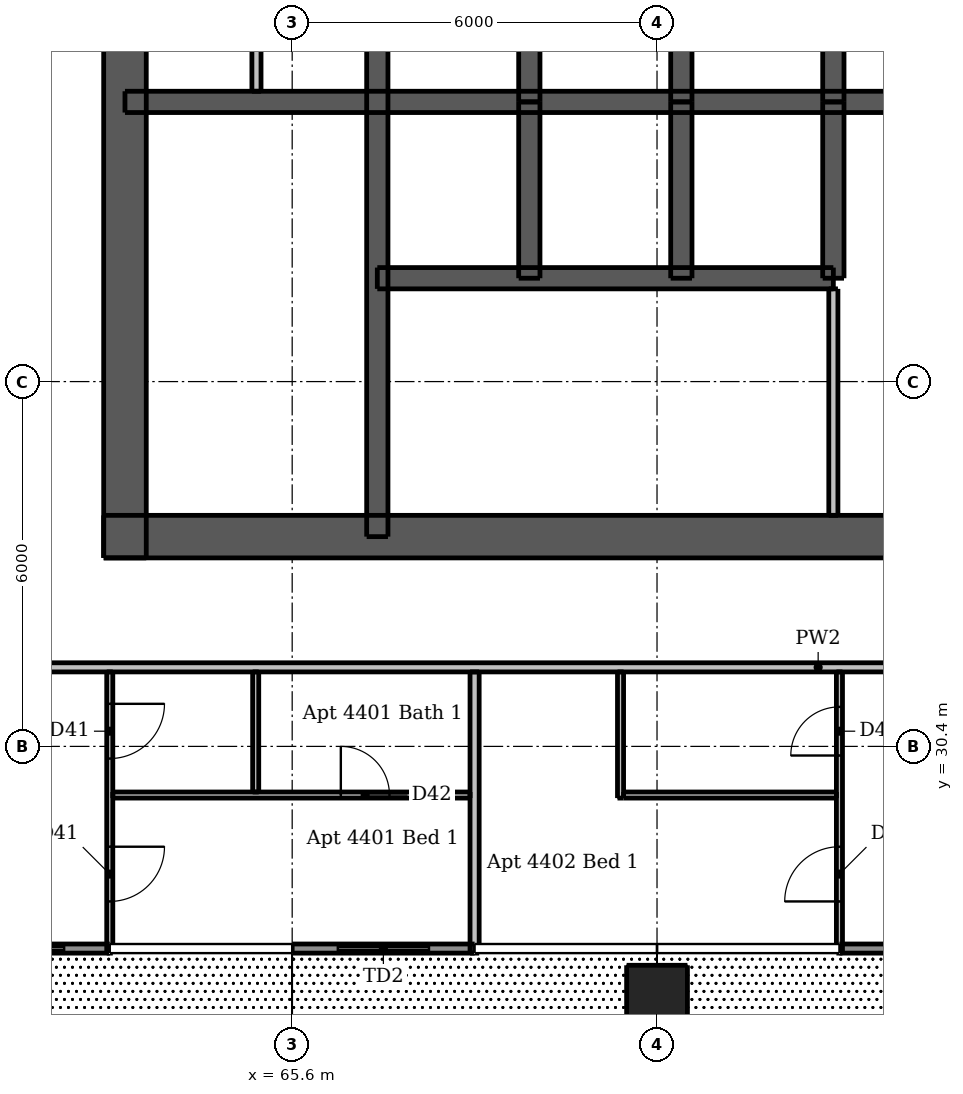
"""IFC4 building model, lengths in metres.
Left out: names, types, materials, properties, quantities, classifications, styles, units other than length and angle.
Written with IfcOpenShell. Run it as: python <this file> out.ifc"""

import sys

from ifc_helpers import new_model, si_unit, direction, frame, frame_2d, origin, origin_2d, place, context, subcontext, project, spatial, rectangle, extrude, element, fill, save


model = new_model("IFC4")
c1 = context("Model", 3, precision=1e-05, world=origin(), true_north=direction((0.0, 1.0)))
c2 = subcontext(c1, "Body", "Model", "MODEL_VIEW")
j1 = project(units=[si_unit("LENGTHUNIT", "METRE"), si_unit("PLANEANGLEUNIT", "RADIAN")], contexts=[c1])
p1 = place(None, origin())
s1 = spatial("IfcSite", under=j1, at=p1, CompositionType="ELEMENT")
p2 = place(p1, origin())
s2 = spatial("IfcBuilding", under=s1, at=p2, CompositionType="ELEMENT")
p3 = place(p2, frame((0.0, 0.0, 164.8)))
s3 = spatial("IfcBuildingStorey", under=s2, at=p3, CompositionType="ELEMENT", Elevation=164.8)
p4 = place(p3, frame((62.5, 33.85, 0.0), z_axis=(0.0, 0.0, 1.0), x_axis=(1.0, 0.0, 0.0)))
e1 = element("IfcWall", 1, at=p4, inside=s3, PredefinedType="SHEAR", context=c2, shape_type="SweptSolid", body=[
    extrude(rectangle(XDim=24.0, YDim=0.7, at=frame_2d((12.0, 0.0))), origin(), (0.0, 0.0, 1.0), 3.05),
])
p5 = place(p4, frame((1.962, 0.0, 0.0)))
e2 = element("IfcOpeningElement", 2, at=p5, cuts=e1, PredefinedType="OPENING", context=c2, shape_type="SweptSolid", body=[
    extrude(rectangle(XDim=1.1, YDim=2.1, at=frame_2d((0.55, 1.05))), frame((0.0, 0.36, 0.0), z_axis=(0.0, -1.0, 0.0), x_axis=(1.0, 0.0, 0.0)), (0.0, 0.0, 1.0), 0.72),
])
p6 = place(p4, frame((20.938, 0.0, 0.0)))
e3 = element("IfcOpeningElement", 3, at=p6, cuts=e1, PredefinedType="OPENING", context=c2, shape_type="SweptSolid", body=[
    extrude(rectangle(XDim=1.1, YDim=2.1, at=frame_2d((0.55, 1.05))), frame((0.0, 0.36, 0.0), z_axis=(0.0, -1.0, 0.0), x_axis=(1.0, 0.0, 0.0)), (0.0, 0.0, 1.0), 0.72),
])
p7 = place(p4, frame((8.0, 0.0, 0.0)))
e4 = element("IfcOpeningElement", 4, at=p7, cuts=e1, PredefinedType="OPENING", context=c2, shape_type="SweptSolid", body=[
    extrude(rectangle(XDim=1.1, YDim=2.1, at=frame_2d((0.55, 1.05))), frame((0.0, 0.36, 0.0), z_axis=(0.0, -1.0, 0.0), x_axis=(1.0, 0.0, 0.0)), (0.0, 0.0, 1.0), 0.72),
])
p8 = place(p4, frame((15.3, 0.0, 0.0)))
e5 = element("IfcOpeningElement", 5, at=p8, cuts=e1, PredefinedType="OPENING", context=c2, shape_type="SweptSolid", body=[
    extrude(rectangle(XDim=0.9, YDim=2.1, at=frame_2d((0.45, 1.05))), frame((0.0, 0.36, 0.0), z_axis=(0.0, -1.0, 0.0), x_axis=(1.0, 0.0, 0.0)), (0.0, 0.0, 1.0), 0.72),
])
p9 = place(p3, frame((62.85, 33.5, 0.0), z_axis=(0.0, 0.0, 1.0), x_axis=(0.0, 1.0, 0.0)))
e6 = element("IfcWall", 6, at=p9, inside=s3, PredefinedType="SHEAR", context=c2, shape_type="SweptSolid", body=[
    extrude(rectangle(XDim=24.0, YDim=0.7, at=frame_2d((12.0, 0.0))), origin(), (0.0, 0.0, 1.0), 3.05),
])
p10 = place(p9, frame((11.2, 0.0, 0.0)))
e7 = element("IfcOpeningElement", 7, at=p10, cuts=e6, PredefinedType="OPENING", context=c2, shape_type="SweptSolid", body=[
    extrude(rectangle(XDim=1.6, YDim=2.1, at=frame_2d((0.8, 1.05))), frame((0.0, 0.36, 0.0), z_axis=(0.0, -1.0, 0.0), x_axis=(1.0, 0.0, 0.0)), (0.0, 0.0, 1.0), 0.72),
])
p11 = place(p3, frame((62.85, 41.0, 0.0), z_axis=(0.0, 0.0, 1.0), x_axis=(1.0, 0.0, 0.0)))
e8 = element("IfcWall", 8, at=p11, inside=s3, PredefinedType="SHEAR", context=c2, shape_type="SweptSolid", body=[
    extrude(rectangle(XDim=23.3, YDim=0.35, at=frame_2d((11.65, 0.0))), origin(), (0.0, 0.0, 1.0), 3.05),
])
p12 = place(p3, frame((67.0, 33.85, 0.0), z_axis=(0.0, 0.0, 1.0), x_axis=(0.0, 1.0, 0.0)))
e9 = element("IfcWall", 9, at=p12, inside=s3, PredefinedType="SHEAR", context=c2, shape_type="SweptSolid", body=[
    extrude(rectangle(XDim=10.05, YDim=0.35, at=frame_2d((5.025, 0.0))), origin(), (0.0, 0.0, 1.0), 3.05),
])
p13 = place(p12, frame((0.55, 0.0, 0.0)))
e10 = element("IfcOpeningElement", 10, at=p13, cuts=e9, PredefinedType="OPENING", context=c2, shape_type="SweptSolid", body=[
    extrude(rectangle(XDim=1.1, YDim=2.1, at=frame_2d((0.55, 1.05))), frame((0.0, 0.185, 0.0), z_axis=(0.0, -1.0, 0.0), x_axis=(1.0, 0.0, 0.0)), (0.0, 0.0, 1.0), 0.37),
])
for number, where, z_axis, x_axis in (
    (11, (69.5, 41.0, 0.0), (0.0, 0.0, 1.0), (0.0, 1.0, 0.0)),
    (12, (72.0, 41.0, 0.0), (0.0, 0.0, 1.0), (0.0, 1.0, 0.0)),
    (13, (74.5, 41.0, 0.0), (0.0, 0.0, 1.0), (0.0, 1.0, 0.0)),
):
    element("IfcWall", number, at=place(p3, frame(where, z_axis=z_axis, x_axis=x_axis)), inside=s3, PredefinedType="SHEAR", context=c2, shape_type="SweptSolid", body=[
        extrude(rectangle(XDim=2.9, YDim=0.35, at=frame_2d((1.45, 0.0))), origin(), (0.0, 0.0, 1.0), 3.05),
    ])
p14 = place(p3, frame((67.0, 38.1, 0.0), z_axis=(0.0, 0.0, 1.0), x_axis=(1.0, 0.0, 0.0)))
e14 = element("IfcWall", 14, at=p14, inside=s3, PredefinedType="SHEAR", context=c2, shape_type="SweptSolid", body=[
    extrude(rectangle(XDim=7.5, YDim=0.35, at=frame_2d((3.75, 0.0))), origin(), (0.0, 0.0, 1.0), 3.05),
])
p15 = place(p14, frame((0.7, 0.0, 0.0)))
e15 = element("IfcOpeningElement", 15, at=p15, cuts=e14, PredefinedType="OPENING", context=c2, shape_type="SweptSolid", body=[
    extrude(rectangle(XDim=1.1, YDim=2.1, at=frame_2d((0.55, 1.05))), frame((0.0, 0.185, 0.0), z_axis=(0.0, -1.0, 0.0), x_axis=(1.0, 0.0, 0.0)), (0.0, 0.0, 1.0), 0.37),
])
p16 = place(p14, frame((3.2, 0.0, 0.0)))
e16 = element("IfcOpeningElement", 16, at=p16, cuts=e14, PredefinedType="OPENING", context=c2, shape_type="SweptSolid", body=[
    extrude(rectangle(XDim=1.1, YDim=2.1, at=frame_2d((0.55, 1.05))), frame((0.0, 0.185, 0.0), z_axis=(0.0, -1.0, 0.0), x_axis=(1.0, 0.0, 0.0)), (0.0, 0.0, 1.0), 0.37),
])
p17 = place(p14, frame((5.65, 0.0, 0.0)))
e17 = element("IfcOpeningElement", 17, at=p17, cuts=e14, PredefinedType="OPENING", context=c2, shape_type="SweptSolid", body=[
    extrude(rectangle(XDim=1.2, YDim=2.1, at=frame_2d((0.6, 1.05))), frame((0.0, 0.185, 0.0), z_axis=(0.0, -1.0, 0.0), x_axis=(1.0, 0.0, 0.0)), (0.0, 0.0, 1.0), 0.37),
])
for number, where, z_axis, x_axis in (
    (18, (69.5, 38.1, 0.0), (0.0, 0.0, 1.0), (0.0, 1.0, 0.0)),
    (19, (72.0, 38.1, 0.0), (0.0, 0.0, 1.0), (0.0, 1.0, 0.0)),
    (20, (74.5, 38.1, 0.0), (0.0, 0.0, 1.0), (0.0, 1.0, 0.0)),
):
    element("IfcWall", number, at=place(p3, frame(where, z_axis=z_axis, x_axis=x_axis)), inside=s3, PredefinedType="SHEAR", context=c2, shape_type="SweptSolid", body=[
        extrude(rectangle(XDim=2.9, YDim=0.35, at=frame_2d((1.45, 0.0))), origin(), (0.0, 0.0, 1.0), 3.05),
    ])
p18 = place(p3, frame((71.6, 26.3, 0.0), z_axis=(0.0, 0.0, 1.0), x_axis=(1.0, 0.0, 0.0)))
e21 = element("IfcColumn", 21, at=p18, inside=s3, PredefinedType="COLUMN", context=c2, shape_type="SweptSolid", body=[
    extrude(rectangle(XDim=1.0, YDim=1.0, at=origin_2d()), origin(), (0.0, 0.0, 1.0), 3.3),
])
p19 = place(p3, frame((59.6, 27.075, 0.0), z_axis=(0.0, 0.0, 1.0), x_axis=(1.0, 0.0, 0.0)))
e22 = element("IfcWall", 22, at=p19, inside=s3, PredefinedType="SOLIDWALL", context=c2, shape_type="SweptSolid", body=[
    extrude(rectangle(XDim=3.0, YDim=0.15, at=frame_2d((1.5, 0.0))), origin(), (0.0, 0.0, 1.0), 3.05),
])
p20 = place(p19, frame((0.75, 0.0, 0.0)))
e23 = element("IfcOpeningElement", 23, at=p20, cuts=e22, PredefinedType="OPENING", context=c2, shape_type="SweptSolid", body=[
    extrude(rectangle(XDim=1.5, YDim=2.4, at=frame_2d((0.75, 1.2))), frame((0.0, 0.085, 0.0), z_axis=(0.0, -1.0, 0.0), x_axis=(1.0, 0.0, 0.0)), (0.0, 0.0, 1.0), 0.17),
])
p21 = place(p3, frame((65.6, 27.075, 0.0), z_axis=(0.0, 0.0, 1.0), x_axis=(1.0, 0.0, 0.0)))
e24 = element("IfcWall", 24, at=p21, inside=s3, PredefinedType="SOLIDWALL", context=c2, shape_type="SweptSolid", body=[
    extrude(rectangle(XDim=3.0, YDim=0.15, at=frame_2d((1.5, 0.0))), origin(), (0.0, 0.0, 1.0), 3.05),
])
p22 = place(p21, frame((0.75, 0.0, 0.0)))
e25 = element("IfcOpeningElement", 25, at=p22, cuts=e24, PredefinedType="OPENING", context=c2, shape_type="SweptSolid", body=[
    extrude(rectangle(XDim=1.5, YDim=2.4, at=frame_2d((0.75, 1.2))), frame((0.0, 0.085, 0.0), z_axis=(0.0, -1.0, 0.0), x_axis=(1.0, 0.0, 0.0)), (0.0, 0.0, 1.0), 0.17),
])
p23 = place(p3, frame((74.6, 27.075, 0.0), z_axis=(0.0, 0.0, 1.0), x_axis=(1.0, 0.0, 0.0)))
e26 = element("IfcWall", 26, at=p23, inside=s3, PredefinedType="SOLIDWALL", context=c2, shape_type="SweptSolid", body=[
    extrude(rectangle(XDim=3.0, YDim=0.15, at=frame_2d((1.5, 0.0))), origin(), (0.0, 0.0, 1.0), 3.05),
])
p24 = place(p23, frame((0.75, 0.0, 0.0)))
e27 = element("IfcOpeningElement", 27, at=p24, cuts=e26, PredefinedType="OPENING", context=c2, shape_type="SweptSolid", body=[
    extrude(rectangle(XDim=1.5, YDim=2.4, at=frame_2d((0.75, 1.2))), frame((0.0, 0.085, 0.0), z_axis=(0.0, -1.0, 0.0), x_axis=(1.0, 0.0, 0.0)), (0.0, 0.0, 1.0), 0.17),
])
p25 = place(p3, frame((74.5, 34.2, 0.0), z_axis=(0.0, 0.0, 1.0), x_axis=(0.0, 1.0, 0.0)))
e28 = element("IfcWall", 28, at=p25, inside=s3, PredefinedType="PLUMBINGWALL", context=c2, shape_type="SweptSolid", body=[
    extrude(rectangle(XDim=3.725, YDim=0.15, at=frame_2d((1.863, 0.0))), origin(), (0.0, 0.0, 1.0), 3.05),
])
p26 = place(p3, frame((65.012, 41.175, 0.0), z_axis=(0.0, 0.0, 1.0), x_axis=(0.0, 1.0, 0.0)))
e29 = element("IfcWall", 29, at=p26, inside=s3, PredefinedType="PLUMBINGWALL", context=c2, shape_type="SweptSolid", body=[
    extrude(rectangle(XDim=2.55, YDim=0.15, at=frame_2d((1.275, 0.0))), origin(), (0.0, 0.0, 1.0), 3.05),
])
p27 = place(p3, frame((62.6, 31.625, 0.0), z_axis=(0.0, 0.0, 1.0), x_axis=(0.0, -1.0, 0.0)))
e30 = element("IfcWall", 30, at=p27, inside=s3, PredefinedType="PARTITIONING", context=c2, shape_type="SweptSolid", body=[
    extrude(rectangle(XDim=4.625, YDim=0.1, at=frame_2d((2.312, 0.0))), origin(), (0.0, 0.0, 1.0), 3.05),
])
p28 = place(p27, frame((0.525, 0.0, 0.0)))
e31 = element("IfcOpeningElement", 31, at=p28, cuts=e30, PredefinedType="OPENING", context=c2, shape_type="SweptSolid", body=[
    extrude(rectangle(XDim=0.9, YDim=2.1, at=frame_2d((0.45, 1.05))), frame((0.0, 0.06, 0.0), z_axis=(0.0, -1.0, 0.0), x_axis=(1.0, 0.0, 0.0)), (0.0, 0.0, 1.0), 0.12),
])
p29 = place(p27, frame((2.875, 0.0, 0.0)))
e32 = element("IfcOpeningElement", 32, at=p29, cuts=e30, PredefinedType="OPENING", context=c2, shape_type="SweptSolid", body=[
    extrude(rectangle(XDim=0.9, YDim=2.1, at=frame_2d((0.45, 1.05))), frame((0.0, 0.06, 0.0), z_axis=(0.0, -1.0, 0.0), x_axis=(1.0, 0.0, 0.0)), (0.0, 0.0, 1.0), 0.12),
])
p30 = place(p3, frame((65.0, 29.65, 0.0), z_axis=(0.0, 0.0, 1.0), x_axis=(0.0, 1.0, 0.0)))
e33 = element("IfcWall", 33, at=p30, inside=s3, PredefinedType="PARTITIONING", context=c2, shape_type="SweptSolid", body=[
    extrude(rectangle(XDim=1.975, YDim=0.1, at=frame_2d((0.988, 0.0))), origin(), (0.0, 0.0, 1.0), 3.05),
])
p31 = place(p3, frame((71.0, 29.55, 0.0), z_axis=(0.0, 0.0, 1.0), x_axis=(0.0, 1.0, 0.0)))
e34 = element("IfcWall", 34, at=p31, inside=s3, PredefinedType="PARTITIONING", context=c2, shape_type="SweptSolid", body=[
    extrude(rectangle(XDim=2.075, YDim=0.1, at=frame_2d((1.038, 0.0))), origin(), (0.0, 0.0, 1.0), 3.05),
])
p32 = place(p3, frame((74.6, 27.0, 0.0), z_axis=(0.0, 0.0, 1.0), x_axis=(0.0, 1.0, 0.0)))
e35 = element("IfcWall", 35, at=p32, inside=s3, PredefinedType="PARTITIONING", context=c2, shape_type="SweptSolid", body=[
    extrude(rectangle(XDim=4.625, YDim=0.1, at=frame_2d((2.312, 0.0))), origin(), (0.0, 0.0, 1.0), 3.05),
])
p33 = place(p32, frame((0.85, 0.0, 0.0)))
e36 = element("IfcOpeningElement", 36, at=p33, cuts=e35, PredefinedType="OPENING", context=c2, shape_type="SweptSolid", body=[
    extrude(rectangle(XDim=0.9, YDim=2.1, at=frame_2d((0.45, 1.05))), frame((0.0, 0.06, 0.0), z_axis=(0.0, -1.0, 0.0), x_axis=(1.0, 0.0, 0.0)), (0.0, 0.0, 1.0), 0.12),
])
p34 = place(p32, frame((3.25, 0.0, 0.0)))
e37 = element("IfcOpeningElement", 37, at=p34, cuts=e35, PredefinedType="OPENING", context=c2, shape_type="SweptSolid", body=[
    extrude(rectangle(XDim=0.8, YDim=2.1, at=frame_2d((0.4, 1.05))), frame((0.0, 0.06, 0.0), z_axis=(0.0, -1.0, 0.0), x_axis=(1.0, 0.0, 0.0)), (0.0, 0.0, 1.0), 0.12),
])
p35 = place(p3, frame((62.65, 29.6, 0.0), z_axis=(0.0, 0.0, 1.0), x_axis=(1.0, 0.0, 0.0)))
e38 = element("IfcWall", 38, at=p35, inside=s3, PredefinedType="PARTITIONING", context=c2, shape_type="SweptSolid", body=[
    extrude(rectangle(XDim=5.875, YDim=0.1, at=frame_2d((2.938, 0.0))), origin(), (0.0, 0.0, 1.0), 3.05),
])
p36 = place(p35, frame((3.75, 0.0, 0.0)))
e39 = element("IfcOpeningElement", 39, at=p36, cuts=e38, PredefinedType="OPENING", context=c2, shape_type="SweptSolid", body=[
    extrude(rectangle(XDim=0.8, YDim=2.1, at=frame_2d((0.4, 1.05))), frame((0.0, 0.06, 0.0), z_axis=(0.0, -1.0, 0.0), x_axis=(1.0, 0.0, 0.0)), (0.0, 0.0, 1.0), 0.12),
])
p37 = place(p3, frame((71.05, 29.6, 0.0), z_axis=(0.0, 0.0, 1.0), x_axis=(1.0, 0.0, 0.0)))
e40 = element("IfcWall", 40, at=p37, inside=s3, PredefinedType="PARTITIONING", context=c2, shape_type="SweptSolid", body=[
    extrude(rectangle(XDim=3.5, YDim=0.1, at=frame_2d((1.75, 0.0))), origin(), (0.0, 0.0, 1.0), 3.05),
])
p38 = place(p3, frame((68.6, 27.0, 0.0), z_axis=(0.0, 0.0, 1.0), x_axis=(0.0, 1.0, 0.0)))
e41 = element("IfcWall", 41, at=p38, inside=s3, PredefinedType="PARTITIONING", context=c2, shape_type="SweptSolid", body=[
    extrude(rectangle(XDim=4.625, YDim=0.15, at=frame_2d((2.312, 0.0))), origin(), (0.0, 0.0, 1.0), 3.05),
])
p39 = place(p3, frame((89.525, 31.7, 0.0), z_axis=(0.0, 0.0, 1.0), x_axis=(-1.0, 0.0, 0.0)))
e42 = element("IfcWall", 42, at=p39, inside=s3, PredefinedType="PARTITIONING", context=c2, shape_type="SweptSolid", body=[
    extrude(rectangle(XDim=30.55, YDim=0.15, at=frame_2d((15.275, 0.0))), origin(), (0.0, 0.0, 1.0), 3.05),
])
p40 = place(p39, frame((28.275, 0.0, 0.0)))
e43 = element("IfcOpeningElement", 43, at=p40, cuts=e42, PredefinedType="OPENING", context=c2, shape_type="SweptSolid", body=[
    extrude(rectangle(XDim=1.0, YDim=2.1, at=frame_2d((0.5, 1.05))), frame((0.0, 0.085, 0.0), z_axis=(0.0, -1.0, 0.0), x_axis=(1.0, 0.0, 0.0)), (0.0, 0.0, 1.0), 0.17),
])
p41 = place(p39, frame((9.925, 0.0, 0.0)))
e44 = element("IfcOpeningElement", 44, at=p41, cuts=e42, PredefinedType="OPENING", context=c2, shape_type="SweptSolid", body=[
    extrude(rectangle(XDim=1.0, YDim=2.1, at=frame_2d((0.5, 1.05))), frame((0.0, 0.085, 0.0), z_axis=(0.0, -1.0, 0.0), x_axis=(1.0, 0.0, 0.0)), (0.0, 0.0, 1.0), 0.17),
])
p42 = place(p20, origin())
e45 = element("IfcDoor", 45, at=p42, inside=s3, OperationType="DOUBLE_DOOR_SLIDING", PredefinedType="DOOR", context=c2, shape_type="SweptSolid", body=[
    extrude(rectangle(XDim=1.5, YDim=2.4, at=frame_2d((0.75, 1.2))), frame((0.0, 0.025, 0.0), z_axis=(0.0, -1.0, 0.0), x_axis=(1.0, 0.0, 0.0)), (0.0, 0.0, 1.0), 0.05),
])
fill(e23, e45)
p43 = place(p22, origin())
e46 = element("IfcDoor", 46, at=p43, inside=s3, OperationType="DOUBLE_DOOR_SLIDING", PredefinedType="DOOR", context=c2, shape_type="SweptSolid", body=[
    extrude(rectangle(XDim=1.5, YDim=2.4, at=frame_2d((0.75, 1.2))), frame((0.0, 0.025, 0.0), z_axis=(0.0, -1.0, 0.0), x_axis=(1.0, 0.0, 0.0)), (0.0, 0.0, 1.0), 0.05),
])
fill(e25, e46)
p44 = place(p5, origin())
e47 = element("IfcDoor", 47, at=p44, inside=s3, OperationType="SINGLE_SWING_LEFT", PredefinedType="DOOR", context=c2, shape_type="SweptSolid", body=[
    extrude(rectangle(XDim=1.1, YDim=2.1, at=frame_2d((0.55, 1.05))), frame((0.0, 0.337, 0.0), z_axis=(0.0, -1.0, 0.0), x_axis=(1.0, 0.0, 0.0)), (0.0, 0.0, 1.0), 0.05),
])
fill(e2, e47)
p45 = place(p7, origin())
e48 = element("IfcDoor", 48, at=p45, inside=s3, OperationType="SINGLE_SWING_LEFT", PredefinedType="DOOR", context=c2, shape_type="SweptSolid", body=[
    extrude(rectangle(XDim=1.1, YDim=2.1, at=frame_2d((0.55, 1.05))), frame((0.0, 0.337, 0.0), z_axis=(0.0, -1.0, 0.0), x_axis=(1.0, 0.0, 0.0)), (0.0, 0.0, 1.0), 0.05),
])
fill(e4, e48)
p46 = place(p13, origin())
e49 = element("IfcDoor", 49, at=p46, inside=s3, OperationType="SINGLE_SWING_RIGHT", PredefinedType="DOOR", context=c2, shape_type="SweptSolid", body=[
    extrude(rectangle(XDim=1.1, YDim=2.1, at=frame_2d((0.55, 1.05))), frame((0.0, -0.112, 0.0), z_axis=(0.0, -1.0, 0.0), x_axis=(1.0, 0.0, 0.0)), (0.0, 0.0, 1.0), 0.05),
])
fill(e10, e49)
p47 = place(p15, origin())
e50 = element("IfcDoor", 50, at=p47, inside=s3, OperationType="DOUBLE_DOOR_SLIDING", PredefinedType="DOOR", context=c2, shape_type="SweptSolid", body=[
    extrude(rectangle(XDim=1.1, YDim=2.1, at=frame_2d((0.55, 1.05))), frame((0.0, 0.025, 0.0), z_axis=(0.0, -1.0, 0.0), x_axis=(1.0, 0.0, 0.0)), (0.0, 0.0, 1.0), 0.05),
])
fill(e15, e50)
p48 = place(p16, origin())
e51 = element("IfcDoor", 51, at=p48, inside=s3, OperationType="DOUBLE_DOOR_SLIDING", PredefinedType="DOOR", context=c2, shape_type="SweptSolid", body=[
    extrude(rectangle(XDim=1.1, YDim=2.1, at=frame_2d((0.55, 1.05))), frame((0.0, 0.025, 0.0), z_axis=(0.0, -1.0, 0.0), x_axis=(1.0, 0.0, 0.0)), (0.0, 0.0, 1.0), 0.05),
])
fill(e16, e51)
p49 = place(p17, origin())
e52 = element("IfcDoor", 52, at=p49, inside=s3, OperationType="DOUBLE_DOOR_SLIDING", PredefinedType="DOOR", context=c2, shape_type="SweptSolid", body=[
    extrude(rectangle(XDim=1.2, YDim=2.1, at=frame_2d((0.6, 1.05))), frame((0.0, 0.025, 0.0), z_axis=(0.0, -1.0, 0.0), x_axis=(1.0, 0.0, 0.0)), (0.0, 0.0, 1.0), 0.05),
])
fill(e17, e52)
p50 = place(p28, origin())
e53 = element("IfcDoor", 53, at=p50, inside=s3, OperationType="SINGLE_SWING_LEFT", PredefinedType="DOOR", context=c2, shape_type="SweptSolid", body=[
    extrude(rectangle(XDim=0.9, YDim=2.1, at=frame_2d((0.45, 1.05))), frame((0.0, 0.025, 0.0), z_axis=(0.0, -1.0, 0.0), x_axis=(1.0, 0.0, 0.0)), (0.0, 0.0, 1.0), 0.05),
])
fill(e31, e53)
p51 = place(p29, origin())
e54 = element("IfcDoor", 54, at=p51, inside=s3, OperationType="SINGLE_SWING_LEFT", PredefinedType="DOOR", context=c2, shape_type="SweptSolid", body=[
    extrude(rectangle(XDim=0.9, YDim=2.1, at=frame_2d((0.45, 1.05))), frame((0.0, 0.025, 0.0), z_axis=(0.0, -1.0, 0.0), x_axis=(1.0, 0.0, 0.0)), (0.0, 0.0, 1.0), 0.05),
])
fill(e32, e54)
p52 = place(p36, origin())
e55 = element("IfcDoor", 55, at=p52, inside=s3, OperationType="SINGLE_SWING_LEFT", PredefinedType="DOOR", context=c2, shape_type="SweptSolid", body=[
    extrude(rectangle(XDim=0.8, YDim=2.1, at=frame_2d((0.4, 1.05))), frame((0.0, 0.025, 0.0), z_axis=(0.0, -1.0, 0.0), x_axis=(1.0, 0.0, 0.0)), (0.0, 0.0, 1.0), 0.05),
])
fill(e39, e55)
p53 = place(p33, origin())
e56 = element("IfcDoor", 56, at=p53, inside=s3, OperationType="SINGLE_SWING_LEFT", PredefinedType="DOOR", context=c2, shape_type="SweptSolid", body=[
    extrude(rectangle(XDim=0.9, YDim=2.1, at=frame_2d((0.45, 1.05))), frame((0.0, 0.025, 0.0), z_axis=(0.0, -1.0, 0.0), x_axis=(1.0, 0.0, 0.0)), (0.0, 0.0, 1.0), 0.05),
])
fill(e36, e56)
p54 = place(p34, origin())
e57 = element("IfcDoor", 57, at=p54, inside=s3, OperationType="SINGLE_SWING_LEFT", PredefinedType="DOOR", context=c2, shape_type="SweptSolid", body=[
    extrude(rectangle(XDim=0.8, YDim=2.1, at=frame_2d((0.4, 1.05))), frame((0.0, 0.025, 0.0), z_axis=(0.0, -1.0, 0.0), x_axis=(1.0, 0.0, 0.0)), (0.0, 0.0, 1.0), 0.05),
])
fill(e37, e57)
save(model, sys.argv[1])
